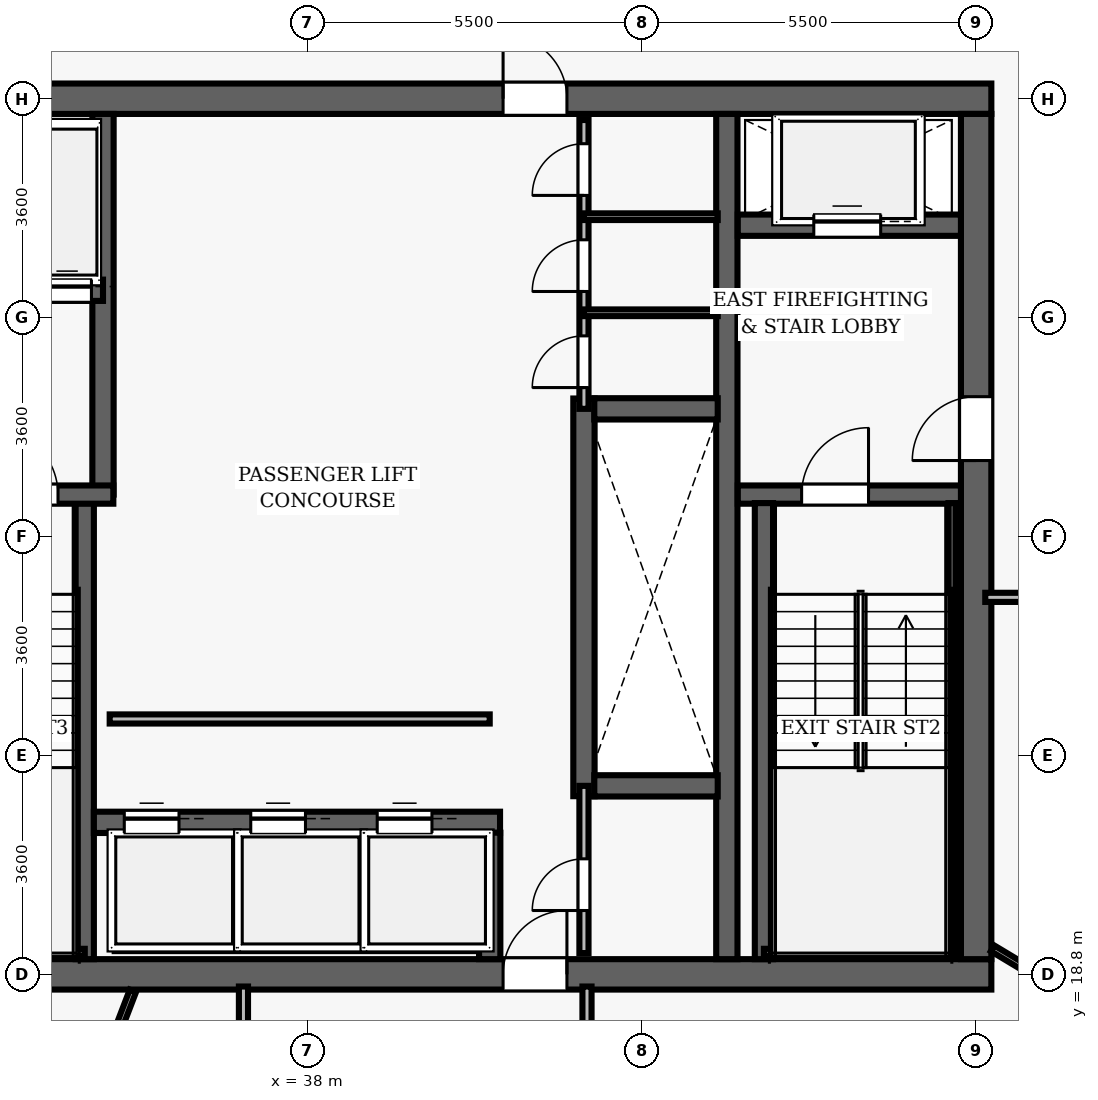
"""IFC4 building model, lengths in metres.
Left out: names, types, materials, properties, quantities, classifications, styles, units other than length and angle.
Written with IfcOpenShell. Run it as: python <this file> out.ifc"""

import sys

from ifc_helpers import new_model, si_unit, direction, frame, frame_2d, origin, place, context, subcontext, project, spatial, rectangle, extrude, element, fill, save


model = new_model("IFC4")
c1 = context("Model", 3, precision=1e-05, world=origin(), true_north=direction((0.0, 1.0)))
c2 = subcontext(c1, "Body", "Model", "MODEL_VIEW")
j1 = project(units=[si_unit("LENGTHUNIT", "METRE"), si_unit("PLANEANGLEUNIT", "RADIAN")], contexts=[c1])
p1 = place(None, origin())
s1 = spatial("IfcSite", under=j1, at=p1, CompositionType="ELEMENT")
p2 = place(p1, origin())
s2 = spatial("IfcBuilding", under=s1, at=p2, CompositionType="ELEMENT")
p3 = place(p2, frame((0.0, 0.0, 182.75)))
s3 = spatial("IfcBuildingStorey", under=s2, at=p3, CompositionType="ELEMENT", Elevation=182.75)
p4 = place(p3, frame((26.75, 18.8, 0.0), z_axis=(0.0, 0.0, 1.0), x_axis=(1.0, 0.0, 0.0)))
e1 = element("IfcWall", 1, at=p4, inside=s3, PredefinedType="SHEAR", context=c2, shape_type="SweptSolid", body=[
    extrude(rectangle(XDim=22.5, YDim=0.5, at=frame_2d((11.25, 0.0))), origin(), (0.0, 0.0, 1.0), 3.85),
])
p5 = place(p4, frame((14.47, 0.0, 0.0)))
e2 = element("IfcOpeningElement", 2, at=p5, cuts=e1, PredefinedType="OPENING", context=c2, shape_type="SweptSolid", body=[
    extrude(rectangle(XDim=1.05, YDim=2.15, at=frame_2d((0.525, 1.075))), frame((0.0, 0.26, 0.0), z_axis=(0.0, -1.0, 0.0), x_axis=(1.0, 0.0, 0.0)), (0.0, 0.0, 1.0), 0.52),
])
p6 = place(p3, frame((26.75, 33.2, 0.0), z_axis=(0.0, 0.0, 1.0), x_axis=(1.0, 0.0, 0.0)))
e3 = element("IfcWall", 3, at=p6, inside=s3, PredefinedType="SHEAR", context=c2, shape_type="SweptSolid", body=[
    extrude(rectangle(XDim=22.5, YDim=0.5, at=frame_2d((11.25, 0.0))), origin(), (0.0, 0.0, 1.0), 3.85),
])
p7 = place(p6, frame((4.57, 0.0, 0.0)))
e4 = element("IfcOpeningElement", 4, at=p7, cuts=e3, PredefinedType="OPENING", context=c2, shape_type="SweptSolid", body=[
    extrude(rectangle(XDim=1.05, YDim=2.15, at=frame_2d((0.525, 1.075))), frame((0.0, 0.26, 0.0), z_axis=(0.0, -1.0, 0.0), x_axis=(1.0, 0.0, 0.0)), (0.0, 0.0, 1.0), 0.52),
])
p8 = place(p6, frame((14.47, 0.0, 0.0)))
e5 = element("IfcOpeningElement", 5, at=p8, cuts=e3, PredefinedType="OPENING", context=c2, shape_type="SweptSolid", body=[
    extrude(rectangle(XDim=1.05, YDim=2.15, at=frame_2d((0.525, 1.075))), frame((0.0, 0.26, 0.0), z_axis=(0.0, -1.0, 0.0), x_axis=(1.0, 0.0, 0.0)), (0.0, 0.0, 1.0), 0.52),
])
p9 = place(p3, frame((49.0, 19.05, 0.0), z_axis=(0.0, 0.0, 1.0), x_axis=(0.0, 1.0, 0.0)))
e6 = element("IfcWall", 6, at=p9, inside=s3, PredefinedType="SHEAR", context=c2, shape_type="SweptSolid", body=[
    extrude(rectangle(XDim=13.9, YDim=0.5, at=frame_2d((6.95, 0.0))), origin(), (0.0, 0.0, 1.0), 3.85),
])
p10 = place(p9, frame((8.2, 0.0, 0.0)))
e7 = element("IfcOpeningElement", 7, at=p10, cuts=e6, PredefinedType="OPENING", context=c2, shape_type="SweptSolid", body=[
    extrude(rectangle(XDim=1.05, YDim=2.15, at=frame_2d((0.525, 1.075))), frame((0.0, 0.26, 0.0), z_axis=(0.0, -1.0, 0.0), x_axis=(1.0, 0.0, 0.0)), (0.0, 0.0, 1.0), 0.52),
])
p11 = place(p3, frame((44.9, 19.05, 0.0), z_axis=(0.0, 0.0, 1.0), x_axis=(0.0, 1.0, 0.0)))
e8 = element("IfcWall", 8, at=p11, inside=s3, PredefinedType="SHEAR", context=c2, shape_type="SweptSolid", body=[
    extrude(rectangle(XDim=13.9, YDim=0.35, at=frame_2d((6.95, 0.0))), origin(), (0.0, 0.0, 1.0), 3.85),
])
p12 = place(p3, frame((45.08, 26.69, 0.0), z_axis=(0.0, 0.0, 1.0), x_axis=(1.0, 0.0, 0.0)))
e9 = element("IfcWall", 9, at=p12, inside=s3, PredefinedType="SHEAR", context=c2, shape_type="SweptSolid", body=[
    extrude(rectangle(XDim=3.67, YDim=0.3, at=frame_2d((1.835, 0.0))), origin(), (0.0, 0.0, 1.0), 3.85),
])
p13 = place(p12, frame((1.05, 0.0, 0.0)))
e10 = element("IfcOpeningElement", 10, at=p13, cuts=e9, PredefinedType="OPENING", context=c2, shape_type="SweptSolid", body=[
    extrude(rectangle(XDim=1.1, YDim=2.15, at=frame_2d((0.55, 1.075))), frame((0.0, 0.16, 0.0), z_axis=(0.0, -1.0, 0.0), x_axis=(1.0, 0.0, 0.0)), (0.0, 0.0, 1.0), 0.32),
])
p14 = place(p3, frame((45.51, 19.05, 0.0), z_axis=(0.0, 0.0, 1.0), x_axis=(0.0, 1.0, 0.0)))
e11 = element("IfcWall", 11, at=p14, inside=s3, PredefinedType="SHEAR", context=c2, shape_type="SweptSolid", body=[
    extrude(rectangle(XDim=7.5, YDim=0.3, at=frame_2d((3.75, 0.0))), origin(), (0.0, 0.0, 1.0), 3.85),
])
p15 = place(p3, frame((48.605, 19.1, 0.0), z_axis=(0.0, 0.0, 1.0), x_axis=(0.0, 1.0, 0.0)))
e12 = element("IfcWall", 12, at=p15, inside=s3, PredefinedType="SHEAR", context=c2, shape_type="SweptSolid", body=[
    extrude(rectangle(XDim=7.45, YDim=0.12, at=frame_2d((3.725, 0.0))), origin(), (0.0, 0.0, 1.0), 3.85),
])
p16 = place(p3, frame((45.51, 19.16, 0.0), z_axis=(0.0, 0.0, 1.0), x_axis=(1.0, 0.0, 0.0)))
e13 = element("IfcWall", 13, at=p16, inside=s3, PredefinedType="SHEAR", context=c2, shape_type="SweptSolid", body=[
    extrude(rectangle(XDim=3.095, YDim=0.12, at=frame_2d((1.547, 0.0))), origin(), (0.0, 0.0, 1.0), 3.85),
])
p17 = place(p3, frame((45.08, 31.12, 0.0), z_axis=(0.0, 0.0, 1.0), x_axis=(1.0, 0.0, 0.0)))
e14 = element("IfcWall", 14, at=p17, inside=s3, PredefinedType="SHEAR", context=c2, shape_type="SweptSolid", body=[
    extrude(rectangle(XDim=3.67, YDim=0.35, at=frame_2d((1.835, 0.0))), origin(), (0.0, 0.0, 1.0), 3.035),
])
p18 = place(p17, frame((1.25, 0.0, 0.0)))
e15 = element("IfcOpeningElement", 15, at=p18, cuts=e14, PredefinedType="OPENING", context=c2, shape_type="SweptSolid", body=[
    extrude(rectangle(XDim=1.1, YDim=2.15, at=frame_2d((0.55, 1.075))), frame((0.0, 0.185, 0.0), z_axis=(0.0, -1.0, 0.0), x_axis=(1.0, 0.0, 0.0)), (0.0, 0.0, 1.0), 0.37),
])
p19 = place(p3, frame((34.34, 19.05, 0.0), z_axis=(0.0, 0.0, 1.0), x_axis=(0.0, 1.0, 0.0)))
e16 = element("IfcWall", 16, at=p19, inside=s3, PredefinedType="SHEAR", context=c2, shape_type="SweptSolid", body=[
    extrude(rectangle(XDim=7.5, YDim=0.3, at=frame_2d((3.75, 0.0))), origin(), (0.0, 0.0, 1.0), 3.85),
])
p20 = place(p3, frame((34.64, 26.69, 0.0), z_axis=(0.0, 0.0, 1.0), x_axis=(0.0, 1.0, 0.0)))
e17 = element("IfcWall", 17, at=p20, inside=s3, PredefinedType="SHEAR", context=c2, shape_type="SweptSolid", body=[
    extrude(rectangle(XDim=6.26, YDim=0.35, at=frame_2d((3.13, 0.0))), origin(), (0.0, 0.0, 1.0), 3.85),
])
p21 = place(p3, frame((31.25, 26.69, 0.0), z_axis=(0.0, 0.0, 1.0), x_axis=(1.0, 0.0, 0.0)))
e18 = element("IfcWall", 18, at=p21, inside=s3, PredefinedType="SHEAR", context=c2, shape_type="SweptSolid", body=[
    extrude(rectangle(XDim=3.56, YDim=0.3, at=frame_2d((1.78, 0.0))), origin(), (0.0, 0.0, 1.0), 3.85),
])
p22 = place(p21, frame((1.55, 0.0, 0.0)))
e19 = element("IfcOpeningElement", 19, at=p22, cuts=e18, PredefinedType="OPENING", context=c2, shape_type="SweptSolid", body=[
    extrude(rectangle(XDim=1.1, YDim=2.15, at=frame_2d((0.55, 1.075))), frame((0.0, 0.16, 0.0), z_axis=(0.0, -1.0, 0.0), x_axis=(1.0, 0.0, 0.0)), (0.0, 0.0, 1.0), 0.32),
])
p23 = place(p3, frame((31.3, 19.16, 0.0), z_axis=(0.0, 0.0, 1.0), x_axis=(1.0, 0.0, 0.0)))
e20 = element("IfcWall", 20, at=p23, inside=s3, PredefinedType="SHEAR", context=c2, shape_type="SweptSolid", body=[
    extrude(rectangle(XDim=3.04, YDim=0.12, at=frame_2d((1.52, 0.0))), origin(), (0.0, 0.0, 1.0), 3.85),
])
p24 = place(p3, frame((32.23, 30.05, 0.0), z_axis=(0.0, 0.0, 1.0), x_axis=(1.0, 0.0, 0.0)))
e21 = element("IfcWall", 21, at=p24, inside=s3, PredefinedType="SHEAR", context=c2, shape_type="SweptSolid", body=[
    extrude(rectangle(XDim=2.41, YDim=0.35, at=frame_2d((1.205, 0.0))), origin(), (0.0, 0.0, 1.0), 3.035),
])
p25 = place(p24, frame((0.42, 0.0, 0.0)))
e22 = element("IfcOpeningElement", 22, at=p25, cuts=e21, PredefinedType="OPENING", context=c2, shape_type="SweptSolid", body=[
    extrude(rectangle(XDim=0.8, YDim=2.15, at=frame_2d((0.4, 1.075))), frame((0.0, 0.185, 0.0), z_axis=(0.0, -1.0, 0.0), x_axis=(1.0, 0.0, 0.0)), (0.0, 0.0, 1.0), 0.37),
])
p26 = place(p24, frame((1.42, 0.0, 0.0)))
e23 = element("IfcOpeningElement", 23, at=p26, cuts=e21, PredefinedType="OPENING", context=c2, shape_type="SweptSolid", body=[
    extrude(rectangle(XDim=0.8, YDim=2.15, at=frame_2d((0.4, 1.075))), frame((0.0, 0.185, 0.0), z_axis=(0.0, -1.0, 0.0), x_axis=(1.0, 0.0, 0.0)), (0.0, 0.0, 1.0), 0.37),
])
p27 = place(p3, frame((42.55, 21.73, 0.0), z_axis=(0.0, 0.0, 1.0), x_axis=(0.0, 1.0, 0.0)))
e24 = element("IfcWall", 24, at=p27, inside=s3, PredefinedType="SHEAR", context=c2, shape_type="SweptSolid", body=[
    extrude(rectangle(XDim=6.54, YDim=0.35, at=frame_2d((3.27, 0.0))), origin(), (0.0, 0.0, 1.0), 3.035),
])
for number, where, z_axis, x_axis in (
    (25, (42.72, 21.9, 0.0), (0.0, 0.0, 1.0), (1.0, 0.0, 0.0)),
    (26, (42.72, 28.1, 0.0), (0.0, 0.0, 1.0), (1.0, 0.0, 0.0)),
):
    element("IfcWall", number, at=place(p3, frame(where, z_axis=z_axis, x_axis=x_axis)), inside=s3, PredefinedType="SHEAR", context=c2, shape_type="SweptSolid", body=[
        extrude(rectangle(XDim=2.03, YDim=0.35, at=frame_2d((1.015, 0.0))), origin(), (0.0, 0.0, 1.0), 3.035),
    ])
p28 = place(p3, frame((34.49, 21.3, 0.0), z_axis=(0.0, 0.0, 1.0), x_axis=(1.0, 0.0, 0.0)))
e27 = element("IfcWall", 27, at=p28, inside=s3, PredefinedType="SHEAR", context=c2, shape_type="SweptSolid", body=[
    extrude(rectangle(XDim=6.68, YDim=0.35, at=frame_2d((3.34, 0.0))), origin(), (0.0, 0.0, 1.0), 3.035),
])
p29 = place(p28, frame((0.5, 0.0, 0.0)))
e28 = element("IfcOpeningElement", 28, at=p29, cuts=e27, PredefinedType="OPENING", context=c2, shape_type="SweptSolid", body=[
    extrude(rectangle(XDim=0.9, YDim=2.15, at=frame_2d((0.45, 1.075))), frame((0.0, 0.185, 0.0), z_axis=(0.0, -1.0, 0.0), x_axis=(1.0, 0.0, 0.0)), (0.0, 0.0, 1.0), 0.37),
])
p30 = place(p28, frame((2.58, 0.0, 0.0)))
e29 = element("IfcOpeningElement", 29, at=p30, cuts=e27, PredefinedType="OPENING", context=c2, shape_type="SweptSolid", body=[
    extrude(rectangle(XDim=0.9, YDim=2.15, at=frame_2d((0.45, 1.075))), frame((0.0, 0.185, 0.0), z_axis=(0.0, -1.0, 0.0), x_axis=(1.0, 0.0, 0.0)), (0.0, 0.0, 1.0), 0.37),
])
p31 = place(p28, frame((4.66, 0.0, 0.0)))
e30 = element("IfcOpeningElement", 30, at=p31, cuts=e27, PredefinedType="OPENING", context=c2, shape_type="SweptSolid", body=[
    extrude(rectangle(XDim=0.9, YDim=2.15, at=frame_2d((0.45, 1.075))), frame((0.0, 0.185, 0.0), z_axis=(0.0, -1.0, 0.0), x_axis=(1.0, 0.0, 0.0)), (0.0, 0.0, 1.0), 0.37),
])
p32 = place(p3, frame((41.0, 19.05, 0.0), z_axis=(0.0, 0.0, 1.0), x_axis=(0.0, 1.0, 0.0)))
e31 = element("IfcWall", 31, at=p32, inside=s3, PredefinedType="SHEAR", context=c2, shape_type="SweptSolid", body=[
    extrude(rectangle(XDim=2.08, YDim=0.35, at=frame_2d((1.04, 0.0))), origin(), (0.0, 0.0, 1.0), 3.035),
])
p33 = place(p3, frame((34.75, 23.0, 0.0), z_axis=(0.0, 0.0, 1.0), x_axis=(1.0, 0.0, 0.0)))
e32 = element("IfcWall", 32, at=p33, inside=s3, PredefinedType="PARTITIONING", context=c2, shape_type="SweptSolid", body=[
    extrude(rectangle(XDim=6.25, YDim=0.15, at=frame_2d((3.125, 0.0))), origin(), (0.0, 0.0, 1.0), 3.035),
])
p34 = place(p3, frame((42.55, 28.1, 0.0), z_axis=(0.0, 0.0, 1.0), x_axis=(0.0, 1.0, 0.0)))
e33 = element("IfcWall", 33, at=p34, inside=s3, PredefinedType="PARTITIONING", context=c2, shape_type="SweptSolid", body=[
    extrude(rectangle(XDim=4.75, YDim=0.15, at=frame_2d((2.375, 0.0))), origin(), (0.0, 0.0, 1.0), 3.035),
])
p35 = place(p34, frame((0.35, 0.0, 0.0)))
e34 = element("IfcOpeningElement", 34, at=p35, cuts=e33, PredefinedType="OPENING", context=c2, shape_type="SweptSolid", body=[
    extrude(rectangle(XDim=0.85, YDim=2.1, at=frame_2d((0.425, 1.05))), frame((0.0, 0.085, 0.0), z_axis=(0.0, -1.0, 0.0), x_axis=(1.0, 0.0, 0.0)), (0.0, 0.0, 1.0), 0.17),
])
p36 = place(p34, frame((1.93, 0.0, 0.0)))
e35 = element("IfcOpeningElement", 35, at=p36, cuts=e33, PredefinedType="OPENING", context=c2, shape_type="SweptSolid", body=[
    extrude(rectangle(XDim=0.85, YDim=2.1, at=frame_2d((0.425, 1.05))), frame((0.0, 0.085, 0.0), z_axis=(0.0, -1.0, 0.0), x_axis=(1.0, 0.0, 0.0)), (0.0, 0.0, 1.0), 0.17),
])
p37 = place(p34, frame((3.51, 0.0, 0.0)))
e36 = element("IfcOpeningElement", 36, at=p37, cuts=e33, PredefinedType="OPENING", context=c2, shape_type="SweptSolid", body=[
    extrude(rectangle(XDim=0.85, YDim=2.1, at=frame_2d((0.425, 1.05))), frame((0.0, 0.085, 0.0), z_axis=(0.0, -1.0, 0.0), x_axis=(1.0, 0.0, 0.0)), (0.0, 0.0, 1.0), 0.17),
])
for number, where, z_axis, x_axis in (
    (37, (42.55, 29.68, 0.0), (0.0, 0.0, 1.0), (1.0, 0.0, 0.0)),
    (38, (42.55, 31.26, 0.0), (0.0, 0.0, 1.0), (1.0, 0.0, 0.0)),
):
    element("IfcWall", number, at=place(p3, frame(where, z_axis=z_axis, x_axis=x_axis)), inside=s3, PredefinedType="PARTITIONING", context=c2, shape_type="SweptSolid", body=[
        extrude(rectangle(XDim=2.2, YDim=0.11, at=frame_2d((1.1, 0.0))), origin(), (0.0, 0.0, 1.0), 3.035),
    ])
p38 = place(p3, frame((42.55, 19.15, 0.0), z_axis=(0.0, 0.0, 1.0), x_axis=(0.0, 1.0, 0.0)))
e39 = element("IfcWall", 39, at=p38, inside=s3, PredefinedType="PARTITIONING", context=c2, shape_type="SweptSolid", body=[
    extrude(rectangle(XDim=2.75, YDim=0.15, at=frame_2d((1.375, 0.0))), origin(), (0.0, 0.0, 1.0), 3.035),
])
p39 = place(p38, frame((0.7, 0.0, 0.0)))
e40 = element("IfcOpeningElement", 40, at=p39, cuts=e39, PredefinedType="OPENING", context=c2, shape_type="SweptSolid", body=[
    extrude(rectangle(XDim=0.85, YDim=2.1, at=frame_2d((0.425, 1.05))), frame((0.0, 0.085, 0.0), z_axis=(0.0, -1.0, 0.0), x_axis=(1.0, 0.0, 0.0)), (0.0, 0.0, 1.0), 0.17),
])
p40 = place(p3, frame((49.15, 25.0, 0.0), z_axis=(0.0, 0.0, 1.0), x_axis=(1.0, 0.0, 0.0)))
e41 = element("IfcWall", 41, at=p40, inside=s3, PredefinedType="PARTITIONING", context=c2, shape_type="SweptSolid", body=[
    extrude(rectangle(XDim=11.066, YDim=0.15, at=frame_2d((5.533, 0.0))), origin(), (0.0, 0.0, 1.0), 3.035),
])
p41 = place(p40, frame((2.292, 0.0, 0.0)))
e42 = element("IfcOpeningElement", 42, at=p41, cuts=e41, PredefinedType="OPENING", context=c2, shape_type="SweptSolid", body=[
    extrude(rectangle(XDim=0.95, YDim=2.15, at=frame_2d((0.475, 1.075))), frame((0.0, 0.085, 0.0), z_axis=(0.0, -1.0, 0.0), x_axis=(1.0, 0.0, 0.0)), (0.0, 0.0, 1.0), 0.17),
])
p42 = place(p3, frame((36.95, 11.2, 0.0), z_axis=(0.0, 0.0, 1.0), x_axis=(0.0, 1.0, 0.0)))
e43 = element("IfcWall", 43, at=p42, inside=s3, PredefinedType="PARTITIONING", context=c2, shape_type="SweptSolid", body=[
    extrude(rectangle(XDim=7.4, YDim=0.15, at=frame_2d((3.7, 0.0))), origin(), (0.0, 0.0, 1.0), 3.035),
])
p43 = place(p42, frame((5.075, 0.0, 0.0)))
e44 = element("IfcOpeningElement", 44, at=p43, cuts=e43, PredefinedType="OPENING", context=c2, shape_type="SweptSolid", body=[
    extrude(rectangle(XDim=0.95, YDim=2.15, at=frame_2d((0.475, 1.075))), frame((0.0, 0.085, 0.0), z_axis=(0.0, -1.0, 0.0), x_axis=(1.0, 0.0, 0.0)), (0.0, 0.0, 1.0), 0.17),
])
p44 = place(p3, frame((42.6, 16.65, 0.0), z_axis=(0.0, 0.0, 1.0), x_axis=(0.0, 1.0, 0.0)))
e45 = element("IfcWall", 45, at=p44, inside=s3, PredefinedType="PARTITIONING", context=c2, shape_type="SweptSolid", body=[
    extrude(rectangle(XDim=1.95, YDim=0.15, at=frame_2d((0.975, 0.0))), origin(), (0.0, 0.0, 1.0), 3.035),
])
p45 = place(p3, frame((35.133, 18.53, 0.0), z_axis=(0.0, 0.0, 1.0), x_axis=(-0.358369457817, -0.933579847525, 0.0)))
e46 = element("IfcWall", 46, at=p45, inside=s3, PredefinedType="PARTITIONING", context=c2, shape_type="SweptSolid", body=[
    extrude(rectangle(XDim=14.118, YDim=0.11, at=frame_2d((7.059, 0.0))), origin(), (0.0, 0.0, 1.0), 3.035),
])
p46 = place(p3, frame((49.27, 19.228, 0.0), z_axis=(0.0, 0.0, 1.0), x_axis=(0.857171890726, -0.515030435751, 0.0)))
e47 = element("IfcWall", 47, at=p46, inside=s3, PredefinedType="PARTITIONING", context=c2, shape_type="SweptSolid", body=[
    extrude(rectangle(XDim=14.971, YDim=0.11, at=frame_2d((7.486, 0.0))), origin(), (0.0, 0.0, 1.0), 3.035),
])
p47 = place(p13, origin())
e48 = element("IfcDoor", 48, at=p47, inside=s3, OperationType="SINGLE_SWING_RIGHT", PredefinedType="DOOR", context=c2, shape_type="SweptSolid", body=[
    extrude(rectangle(XDim=1.1, YDim=2.15, at=frame_2d((0.55, 1.075))), frame((0.0, 0.025, 0.0), z_axis=(0.0, -1.0, 0.0), x_axis=(1.0, 0.0, 0.0)), (0.0, 0.0, 1.0), 0.05),
])
fill(e10, e48)
p48 = place(p10, origin())
e49 = element("IfcDoor", 49, at=p48, inside=s3, OperationType="SINGLE_SWING_LEFT", PredefinedType="DOOR", context=c2, shape_type="SweptSolid", body=[
    extrude(rectangle(XDim=1.05, YDim=2.15, at=frame_2d((0.525, 1.075))), frame((0.0, 0.025, 0.0), z_axis=(0.0, -1.0, 0.0), x_axis=(1.0, 0.0, 0.0)), (0.0, 0.0, 1.0), 0.05),
])
fill(e7, e49)
p49 = place(p22, origin())
e50 = element("IfcDoor", 50, at=p49, inside=s3, OperationType="SINGLE_SWING_LEFT", PredefinedType="DOOR", context=c2, shape_type="SweptSolid", body=[
    extrude(rectangle(XDim=1.1, YDim=2.15, at=frame_2d((0.55, 1.075))), frame((0.0, 0.025, 0.0), z_axis=(0.0, -1.0, 0.0), x_axis=(1.0, 0.0, 0.0)), (0.0, 0.0, 1.0), 0.05),
])
fill(e19, e50)
p50 = place(p8, origin())
e51 = element("IfcDoor", 51, at=p50, inside=s3, OperationType="SINGLE_SWING_LEFT", PredefinedType="DOOR", context=c2, shape_type="SweptSolid", body=[
    extrude(rectangle(XDim=1.05, YDim=2.15, at=frame_2d((0.525, 1.075))), frame((0.0, 0.025, 0.0), z_axis=(0.0, -1.0, 0.0), x_axis=(1.0, 0.0, 0.0)), (0.0, 0.0, 1.0), 0.05),
])
fill(e5, e51)
p51 = place(p5, origin())
e52 = element("IfcDoor", 52, at=p51, inside=s3, OperationType="SINGLE_SWING_RIGHT", PredefinedType="DOOR", context=c2, shape_type="SweptSolid", body=[
    extrude(rectangle(XDim=1.05, YDim=2.15, at=frame_2d((0.525, 1.075))), frame((0.0, 0.025, 0.0), z_axis=(0.0, -1.0, 0.0), x_axis=(1.0, 0.0, 0.0)), (0.0, 0.0, 1.0), 0.05),
])
fill(e2, e52)
p52 = place(p35, origin())
e53 = element("IfcDoor", 53, at=p52, inside=s3, OperationType="SINGLE_SWING_LEFT", PredefinedType="DOOR", context=c2, shape_type="SweptSolid", body=[
    extrude(rectangle(XDim=0.85, YDim=2.1, at=frame_2d((0.425, 1.05))), frame((0.0, 0.025, 0.0), z_axis=(0.0, -1.0, 0.0), x_axis=(1.0, 0.0, 0.0)), (0.0, 0.0, 1.0), 0.05),
])
fill(e34, e53)
p53 = place(p36, origin())
e54 = element("IfcDoor", 54, at=p53, inside=s3, OperationType="SINGLE_SWING_LEFT", PredefinedType="DOOR", context=c2, shape_type="SweptSolid", body=[
    extrude(rectangle(XDim=0.85, YDim=2.1, at=frame_2d((0.425, 1.05))), frame((0.0, 0.025, 0.0), z_axis=(0.0, -1.0, 0.0), x_axis=(1.0, 0.0, 0.0)), (0.0, 0.0, 1.0), 0.05),
])
fill(e35, e54)
p54 = place(p37, origin())
e55 = element("IfcDoor", 55, at=p54, inside=s3, OperationType="SINGLE_SWING_LEFT", PredefinedType="DOOR", context=c2, shape_type="SweptSolid", body=[
    extrude(rectangle(XDim=0.85, YDim=2.1, at=frame_2d((0.425, 1.05))), frame((0.0, 0.025, 0.0), z_axis=(0.0, -1.0, 0.0), x_axis=(1.0, 0.0, 0.0)), (0.0, 0.0, 1.0), 0.05),
])
fill(e36, e55)
p55 = place(p39, origin())
e56 = element("IfcDoor", 56, at=p55, inside=s3, OperationType="SINGLE_SWING_LEFT", PredefinedType="DOOR", context=c2, shape_type="SweptSolid", body=[
    extrude(rectangle(XDim=0.85, YDim=2.1, at=frame_2d((0.425, 1.05))), frame((0.0, 0.025, 0.0), z_axis=(0.0, -1.0, 0.0), x_axis=(1.0, 0.0, 0.0)), (0.0, 0.0, 1.0), 0.05),
])
fill(e40, e56)
p56 = place(p29, origin())
e57 = element("IfcDoor", 57, at=p56, inside=s3, OperationType="SLIDING_TO_LEFT", PredefinedType="DOOR", context=c2, shape_type="SweptSolid", body=[
    extrude(rectangle(XDim=0.9, YDim=2.15, at=frame_2d((0.45, 1.075))), frame((0.0, 0.025, 0.0), z_axis=(0.0, -1.0, 0.0), x_axis=(1.0, 0.0, 0.0)), (0.0, 0.0, 1.0), 0.05),
])
fill(e28, e57)
p57 = place(p30, origin())
e58 = element("IfcDoor", 58, at=p57, inside=s3, OperationType="SLIDING_TO_LEFT", PredefinedType="DOOR", context=c2, shape_type="SweptSolid", body=[
    extrude(rectangle(XDim=0.9, YDim=2.15, at=frame_2d((0.45, 1.075))), frame((0.0, 0.025, 0.0), z_axis=(0.0, -1.0, 0.0), x_axis=(1.0, 0.0, 0.0)), (0.0, 0.0, 1.0), 0.05),
])
fill(e29, e58)
p58 = place(p31, origin())
e59 = element("IfcDoor", 59, at=p58, inside=s3, OperationType="SLIDING_TO_LEFT", PredefinedType="DOOR", context=c2, shape_type="SweptSolid", body=[
    extrude(rectangle(XDim=0.9, YDim=2.15, at=frame_2d((0.45, 1.075))), frame((0.0, 0.025, 0.0), z_axis=(0.0, -1.0, 0.0), x_axis=(1.0, 0.0, 0.0)), (0.0, 0.0, 1.0), 0.05),
])
fill(e30, e59)
p59 = place(p18, origin())
e60 = element("IfcDoor", 60, at=p59, inside=s3, OperationType="SLIDING_TO_LEFT", PredefinedType="DOOR", context=c2, shape_type="SweptSolid", body=[
    extrude(rectangle(XDim=1.1, YDim=2.15, at=frame_2d((0.55, 1.075))), frame((0.0, 0.025, 0.0), z_axis=(0.0, -1.0, 0.0), x_axis=(1.0, 0.0, 0.0)), (0.0, 0.0, 1.0), 0.05),
])
fill(e15, e60)
p60 = place(p26, origin())
e61 = element("IfcDoor", 61, at=p60, inside=s3, OperationType="SLIDING_TO_LEFT", PredefinedType="DOOR", context=c2, shape_type="SweptSolid", body=[
    extrude(rectangle(XDim=0.8, YDim=2.15, at=frame_2d((0.4, 1.075))), frame((0.0, 0.025, 0.0), z_axis=(0.0, -1.0, 0.0), x_axis=(1.0, 0.0, 0.0)), (0.0, 0.0, 1.0), 0.05),
])
fill(e23, e61)
save(model, sys.argv[1])
